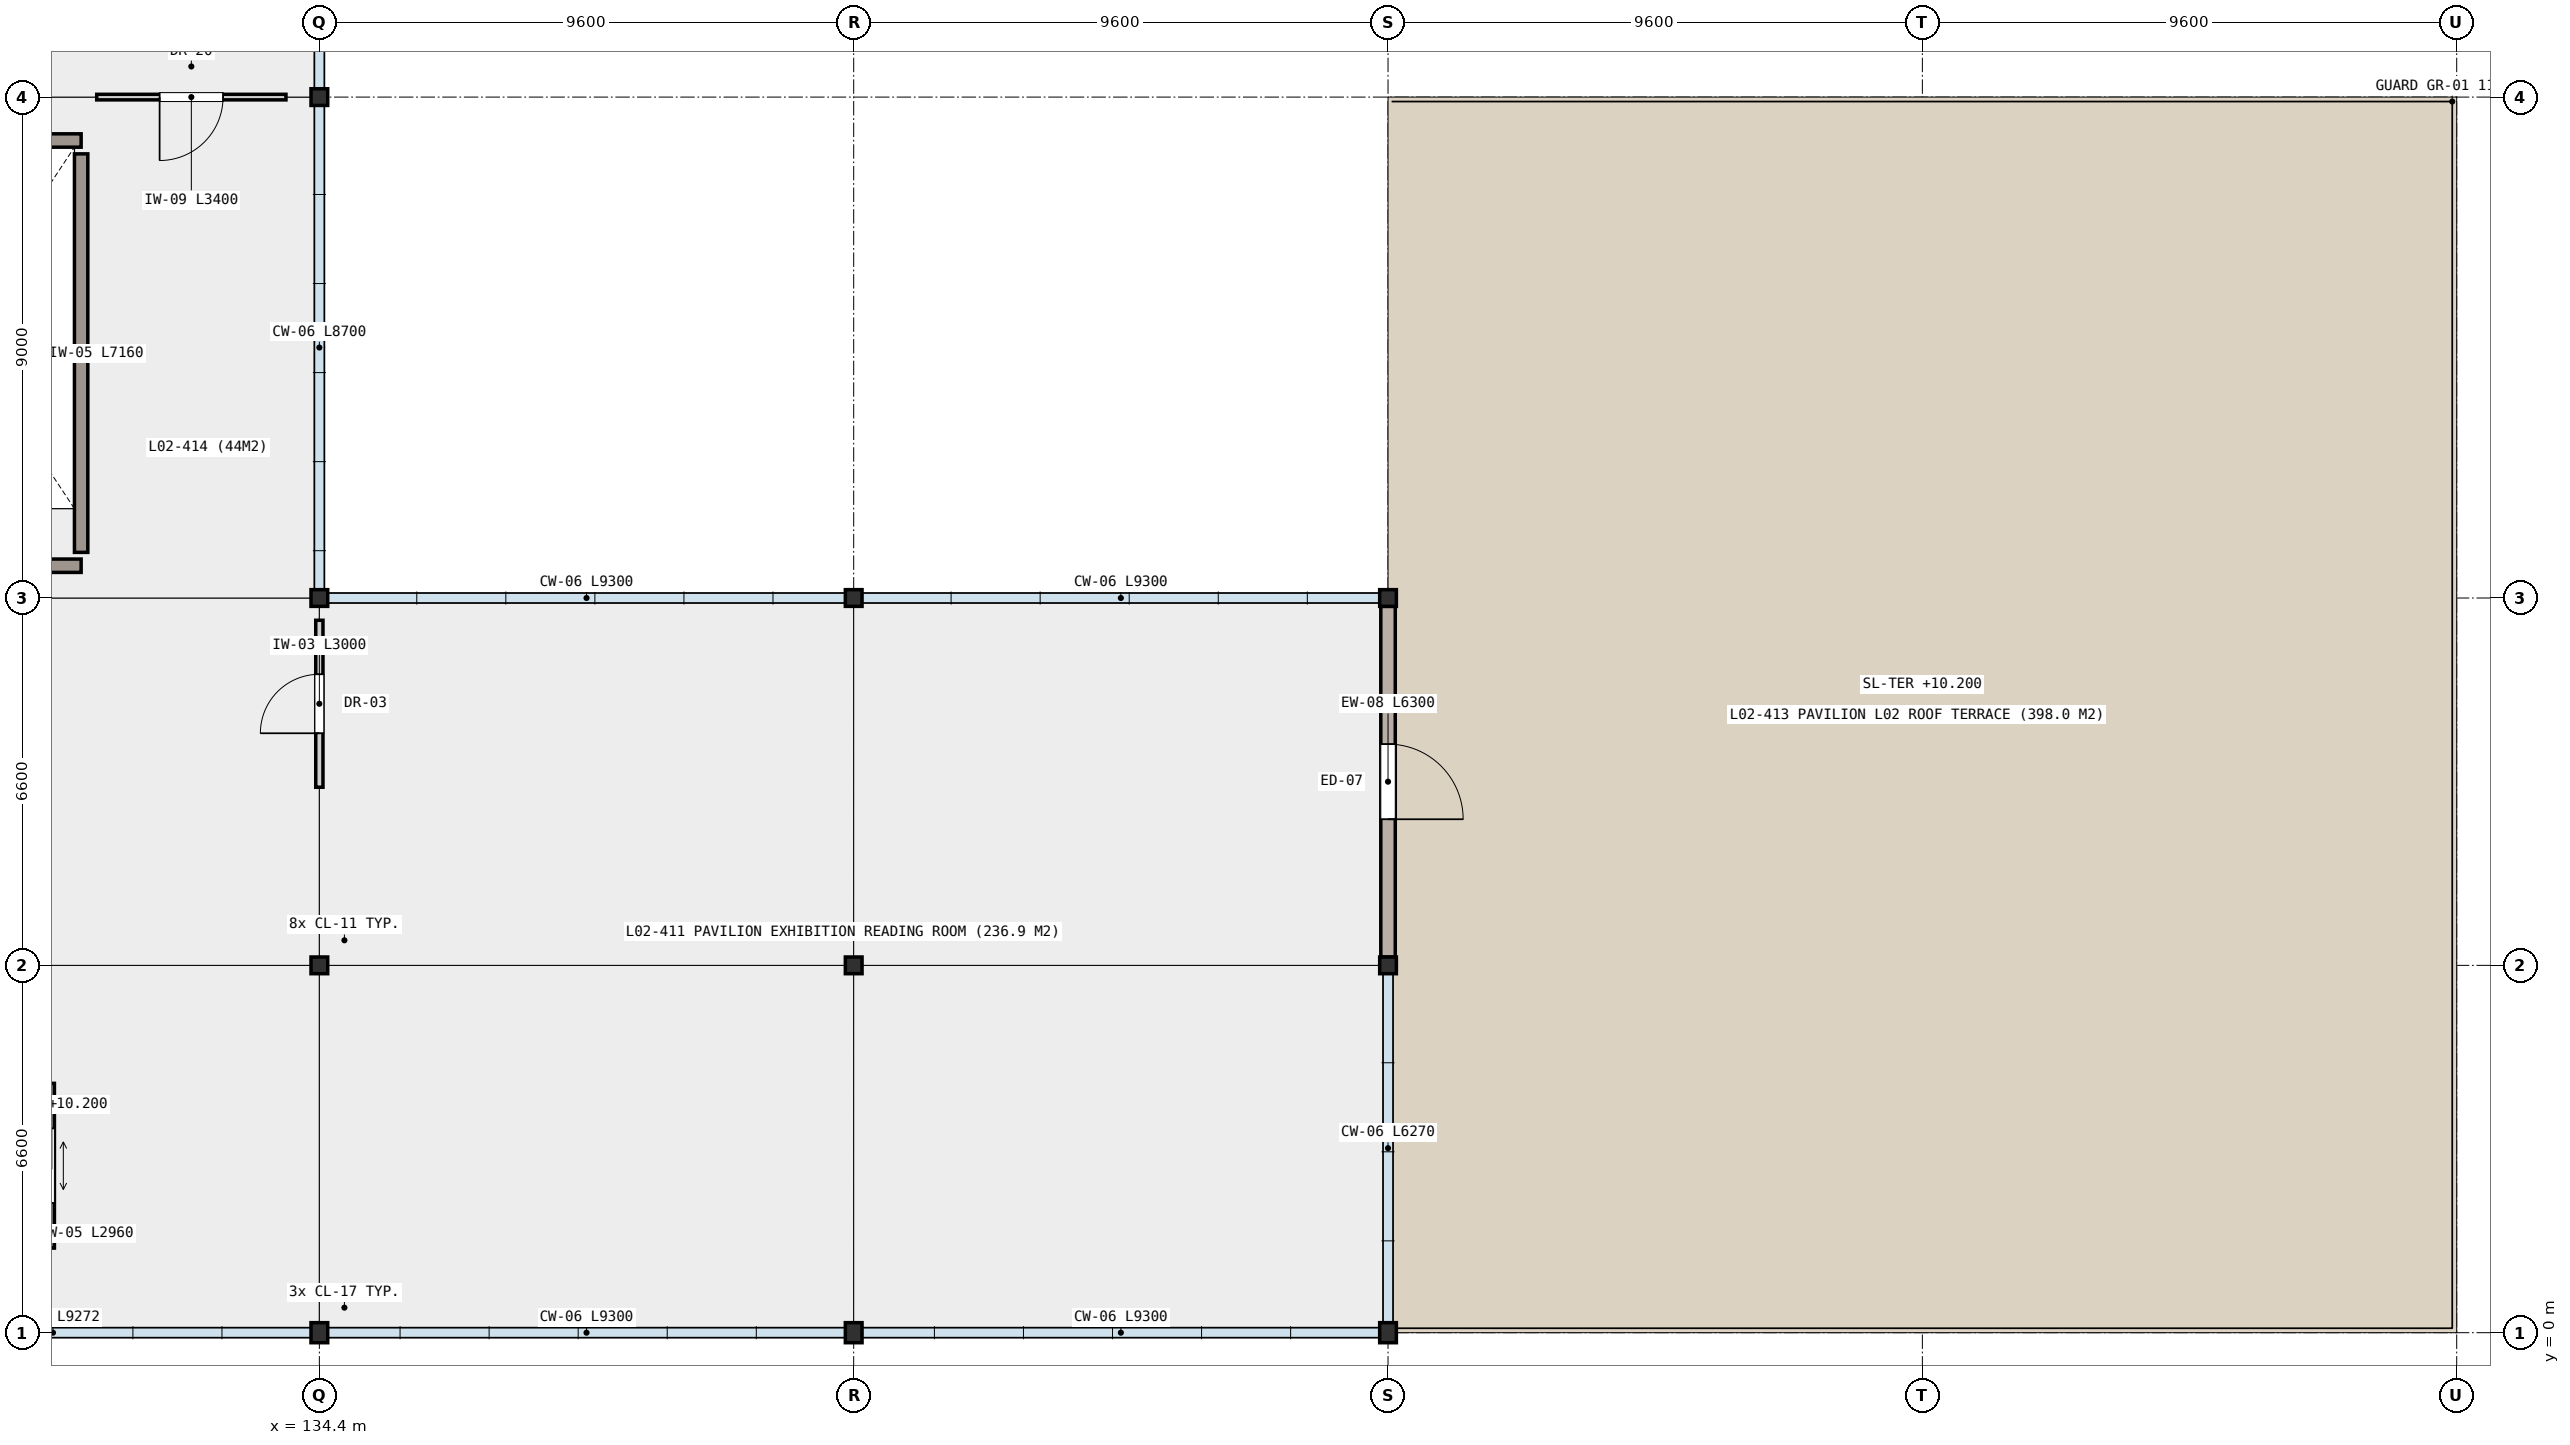
"""IFC4 building model, lengths in metres.
Left out: names, types, materials, properties, quantities, classifications, styles, units other than length and angle.
Written with IfcOpenShell. Run it as: python <this file> out.ifc"""

import sys

from ifc_helpers import new_model, si_unit, direction, frame, frame_2d, origin, origin_2d, place, context, subcontext, project, spatial, rectangle, i_section, extrude, element, fill, save


model = new_model("IFC4")
c1 = context("Model", 3, precision=1e-05, world=origin(), true_north=direction((0.0, 1.0)))
c2 = subcontext(c1, "Body", "Model", "MODEL_VIEW")
j1 = project(units=[si_unit("LENGTHUNIT", "METRE"), si_unit("PLANEANGLEUNIT", "RADIAN")], contexts=[c1])
p1 = place(None, origin())
s1 = spatial("IfcSite", under=j1, at=p1, CompositionType="ELEMENT")
p2 = place(p1, origin())
s2 = spatial("IfcBuilding", under=s1, at=p2, CompositionType="ELEMENT")
p3 = place(p2, frame((0.0, 0.0, 10.2)))
s3 = spatial("IfcBuildingStorey", under=s2, at=p3, CompositionType="ELEMENT", Elevation=10.2)
p4 = place(p3, frame((134.4, 0.0, 0.0), z_axis=(0.0, 0.0, 1.0), x_axis=(1.0, 0.0, 0.0)))
e1 = element("IfcColumn", 1, at=p4, inside=s3, PredefinedType="COLUMN", context=c2, shape_type="SweptSolid", body=[
    extrude(i_section(OverallWidth=0.3, OverallDepth=0.36, WebThickness=0.012, FlangeThickness=0.022, FilletRadius=0.027, at=origin_2d()), origin(), (0.0, 0.0, 1.0), 4.2),
])
for number, where, z_axis, x_axis in (
    (2, (134.4, 6.6, 0.0), (0.0, 0.0, 1.0), (1.0, 0.0, 0.0)),
    (3, (134.4, 13.2, 0.0), (0.0, 0.0, 1.0), (1.0, 0.0, 0.0)),
    (4, (134.4, 22.2, 0.0), (0.0, 0.0, 1.0), (1.0, 0.0, 0.0)),
):
    element("IfcColumn", number, at=place(p3, frame(where, z_axis=z_axis, x_axis=x_axis)), inside=s3, PredefinedType="COLUMN", context=c2, shape_type="SweptSolid", body=[
        extrude(i_section(OverallWidth=0.3, OverallDepth=0.3, WebThickness=0.011, FlangeThickness=0.019, FilletRadius=0.027, at=origin_2d()), origin(), (0.0, 0.0, 1.0), 4.2),
    ])
p5 = place(p3, frame((144.0, 0.0, 0.0), z_axis=(0.0, 0.0, 1.0), x_axis=(1.0, 0.0, 0.0)))
e5 = element("IfcColumn", 5, at=p5, inside=s3, PredefinedType="COLUMN", context=c2, shape_type="SweptSolid", body=[
    extrude(i_section(OverallWidth=0.3, OverallDepth=0.36, WebThickness=0.012, FlangeThickness=0.022, FilletRadius=0.027, at=origin_2d()), origin(), (0.0, 0.0, 1.0), 4.2),
])
for number, where, z_axis, x_axis in (
    (6, (144.0, 6.6, 0.0), (0.0, 0.0, 1.0), (1.0, 0.0, 0.0)),
    (7, (144.0, 13.2, 0.0), (0.0, 0.0, 1.0), (1.0, 0.0, 0.0)),
):
    element("IfcColumn", number, at=place(p3, frame(where, z_axis=z_axis, x_axis=x_axis)), inside=s3, PredefinedType="COLUMN", context=c2, shape_type="SweptSolid", body=[
        extrude(i_section(OverallWidth=0.3, OverallDepth=0.3, WebThickness=0.011, FlangeThickness=0.019, FilletRadius=0.027, at=origin_2d()), origin(), (0.0, 0.0, 1.0), 4.2),
    ])
p6 = place(p3, frame((153.6, 0.0, 0.0), z_axis=(0.0, 0.0, 1.0), x_axis=(1.0, 0.0, 0.0)))
e8 = element("IfcColumn", 8, at=p6, inside=s3, PredefinedType="COLUMN", context=c2, shape_type="SweptSolid", body=[
    extrude(i_section(OverallWidth=0.3, OverallDepth=0.36, WebThickness=0.012, FlangeThickness=0.022, FilletRadius=0.027, at=origin_2d()), origin(), (0.0, 0.0, 1.0), 4.2),
])
for number, where, z_axis, x_axis in (
    (9, (153.6, 6.6, 0.0), (0.0, 0.0, 1.0), (1.0, 0.0, 0.0)),
    (10, (153.6, 13.2, 0.0), (0.0, 0.0, 1.0), (1.0, 0.0, 0.0)),
):
    element("IfcColumn", number, at=place(p3, frame(where, z_axis=z_axis, x_axis=x_axis)), inside=s3, PredefinedType="COLUMN", context=c2, shape_type="SweptSolid", body=[
        extrude(i_section(OverallWidth=0.3, OverallDepth=0.3, WebThickness=0.011, FlangeThickness=0.019, FilletRadius=0.027, at=origin_2d()), origin(), (0.0, 0.0, 1.0), 4.2),
    ])
p7 = place(p3, frame((153.6, 13.05, 0.0), z_axis=(0.0, 0.0, 1.0), x_axis=(0.0, -1.0, 0.0)))
e11 = element("IfcWall", 11, at=p7, inside=s3, PredefinedType="SOLIDWALL", context=c2, shape_type="SweptSolid", body=[
    extrude(rectangle(XDim=6.3, YDim=0.26, at=frame_2d((3.15, 0.0))), origin(), (0.0, 0.0, 1.0), 3.57),
])
p8 = place(p7, frame((2.475, 0.0, 0.0)))
e12 = element("IfcOpeningElement", 12, at=p8, cuts=e11, PredefinedType="OPENING", context=c2, shape_type="SweptSolid", body=[
    extrude(rectangle(XDim=1.35, YDim=2.2, at=frame_2d((0.675, 1.1))), frame((0.0, 0.14, 0.0), z_axis=(0.0, -1.0, 0.0), x_axis=(1.0, 0.0, 0.0)), (0.0, 0.0, 1.0), 0.28),
])
p9 = place(p3, frame((129.52, 4.48, 0.0), z_axis=(0.0, 0.0, 1.0), x_axis=(0.0, -1.0, 0.0)))
e13 = element("IfcWall", 13, at=p9, inside=s3, PredefinedType="SHEAR", context=c2, shape_type="SweptSolid", body=[
    extrude(rectangle(XDim=2.96, YDim=0.24, at=frame_2d((1.48, 0.0))), origin(), (0.0, 0.0, 1.0), 3.95),
])
p10 = place(p9, frame((0.81, 0.0, 0.0)))
e14 = element("IfcOpeningElement", 14, at=p10, cuts=e13, PredefinedType="OPENING", context=c2, shape_type="SweptSolid", body=[
    extrude(rectangle(XDim=1.34, YDim=2.18, at=frame_2d((0.67, 1.09))), frame((0.0, 0.13, 0.0), z_axis=(0.0, -1.0, 0.0), x_axis=(1.0, 0.0, 0.0)), (0.0, 0.0, 1.0), 0.26),
])
p11 = place(p3, frame((130.12, 13.78, 0.0), z_axis=(0.0, 0.0, 1.0), x_axis=(-1.0, 0.0, 0.0)))
e15 = element("IfcWall", 15, at=p11, inside=s3, PredefinedType="SHEAR", context=c2, shape_type="SweptSolid", body=[
    extrude(rectangle(XDim=4.54, YDim=0.24, at=frame_2d((2.27, 0.0))), origin(), (0.0, 0.0, 1.0), 3.95),
])
p12 = place(p11, frame((1.61, 0.0, 0.0)))
e16 = element("IfcOpeningElement", 16, at=p12, cuts=e15, PredefinedType="OPENING", context=c2, shape_type="SweptSolid", body=[
    extrude(rectangle(XDim=1.32, YDim=2.15, at=frame_2d((0.66, 1.075))), frame((0.0, 0.13, 0.0), z_axis=(0.0, -1.0, 0.0), x_axis=(1.0, 0.0, 0.0)), (0.0, 0.0, 1.0), 0.26),
])
p13 = place(p3, frame((125.58, 21.42, 0.0), z_axis=(0.0, 0.0, 1.0), x_axis=(1.0, 0.0, 0.0)))
e17 = element("IfcWall", 17, at=p13, inside=s3, PredefinedType="SHEAR", context=c2, shape_type="SweptSolid", body=[
    extrude(rectangle(XDim=4.54, YDim=0.24, at=frame_2d((2.27, 0.0))), origin(), (0.0, 0.0, 1.0), 3.95),
])
p14 = place(p3, frame((130.12, 21.18, 0.0), z_axis=(0.0, 0.0, 1.0), x_axis=(0.0, -1.0, 0.0)))
e18 = element("IfcWall", 18, at=p14, inside=s3, PredefinedType="SHEAR", context=c2, shape_type="SweptSolid", body=[
    extrude(rectangle(XDim=7.16, YDim=0.24, at=frame_2d((3.58, 0.0))), origin(), (0.0, 0.0, 1.0), 3.95),
])
p15 = place(p3, frame((134.4, 9.8, 0.0), z_axis=(0.0, 0.0, 1.0), x_axis=(0.0, 1.0, 0.0)))
e19 = element("IfcWall", 19, at=p15, inside=s3, PredefinedType="PARTITIONING", context=c2, shape_type="SweptSolid", body=[
    extrude(rectangle(XDim=3.0, YDim=0.13, at=frame_2d((1.5, 0.0))), origin(), (0.0, 0.0, 1.0), 3.57),
])
p16 = place(p15, frame((0.97, 0.0, 0.0)))
e20 = element("IfcOpeningElement", 20, at=p16, cuts=e19, PredefinedType="OPENING", context=c2, shape_type="SweptSolid", body=[
    extrude(rectangle(XDim=1.06, YDim=2.14, at=frame_2d((0.53, 1.07))), frame((0.0, 0.075, 0.0), z_axis=(0.0, -1.0, 0.0), x_axis=(1.0, 0.0, 0.0)), (0.0, 0.0, 1.0), 0.15),
])
p17 = place(p3, frame((133.8, 22.2, 0.0), z_axis=(0.0, 0.0, 1.0), x_axis=(-1.0, 0.0, 0.0)))
e21 = element("IfcWall", 21, at=p17, inside=s3, PredefinedType="PARTITIONING", context=c2, shape_type="SweptSolid", body=[
    extrude(rectangle(XDim=3.4, YDim=0.1, at=frame_2d((1.7, 0.0))), origin(), (0.0, 0.0, 1.0), 3.57),
])
p18 = place(p17, frame((1.13, 0.0, 0.0)))
e22 = element("IfcOpeningElement", 22, at=p18, cuts=e21, PredefinedType="OPENING", context=c2, shape_type="SweptSolid", body=[
    extrude(rectangle(XDim=1.14, YDim=2.16, at=frame_2d((0.57, 1.08))), frame((0.0, 0.06, 0.0), z_axis=(0.0, -1.0, 0.0), x_axis=(1.0, 0.0, 0.0)), (0.0, 0.0, 1.0), 0.12),
])
p19 = place(p8, origin())
e23 = element("IfcDoor", 23, at=p19, inside=s3, OperationType="SINGLE_SWING_RIGHT", PredefinedType="DOOR", context=c2, shape_type="SweptSolid", body=[
    extrude(rectangle(XDim=1.35, YDim=2.2, at=frame_2d((0.675, 1.1))), frame((0.0, 0.025, 0.0), z_axis=(0.0, -1.0, 0.0), x_axis=(1.0, 0.0, 0.0)), (0.0, 0.0, 1.0), 0.05),
])
fill(e12, e23)
p20 = place(p16, origin())
e24 = element("IfcDoor", 24, at=p20, inside=s3, OperationType="SINGLE_SWING_LEFT", PredefinedType="DOOR", context=c2, shape_type="SweptSolid", body=[
    extrude(rectangle(XDim=1.06, YDim=2.14, at=frame_2d((0.53, 1.07))), frame((0.0, 0.025, 0.0), z_axis=(0.0, -1.0, 0.0), x_axis=(1.0, 0.0, 0.0)), (0.0, 0.0, 1.0), 0.05),
])
fill(e20, e24)
p21 = place(p18, origin())
e25 = element("IfcDoor", 25, at=p21, inside=s3, OperationType="SINGLE_SWING_RIGHT", PredefinedType="DOOR", context=c2, shape_type="SweptSolid", body=[
    extrude(rectangle(XDim=1.14, YDim=2.16, at=frame_2d((0.57, 1.08))), frame((0.0, 0.025, 0.0), z_axis=(0.0, -1.0, 0.0), x_axis=(1.0, 0.0, 0.0)), (0.0, 0.0, 1.0), 0.05),
])
fill(e22, e25)
save(model, sys.argv[1])
